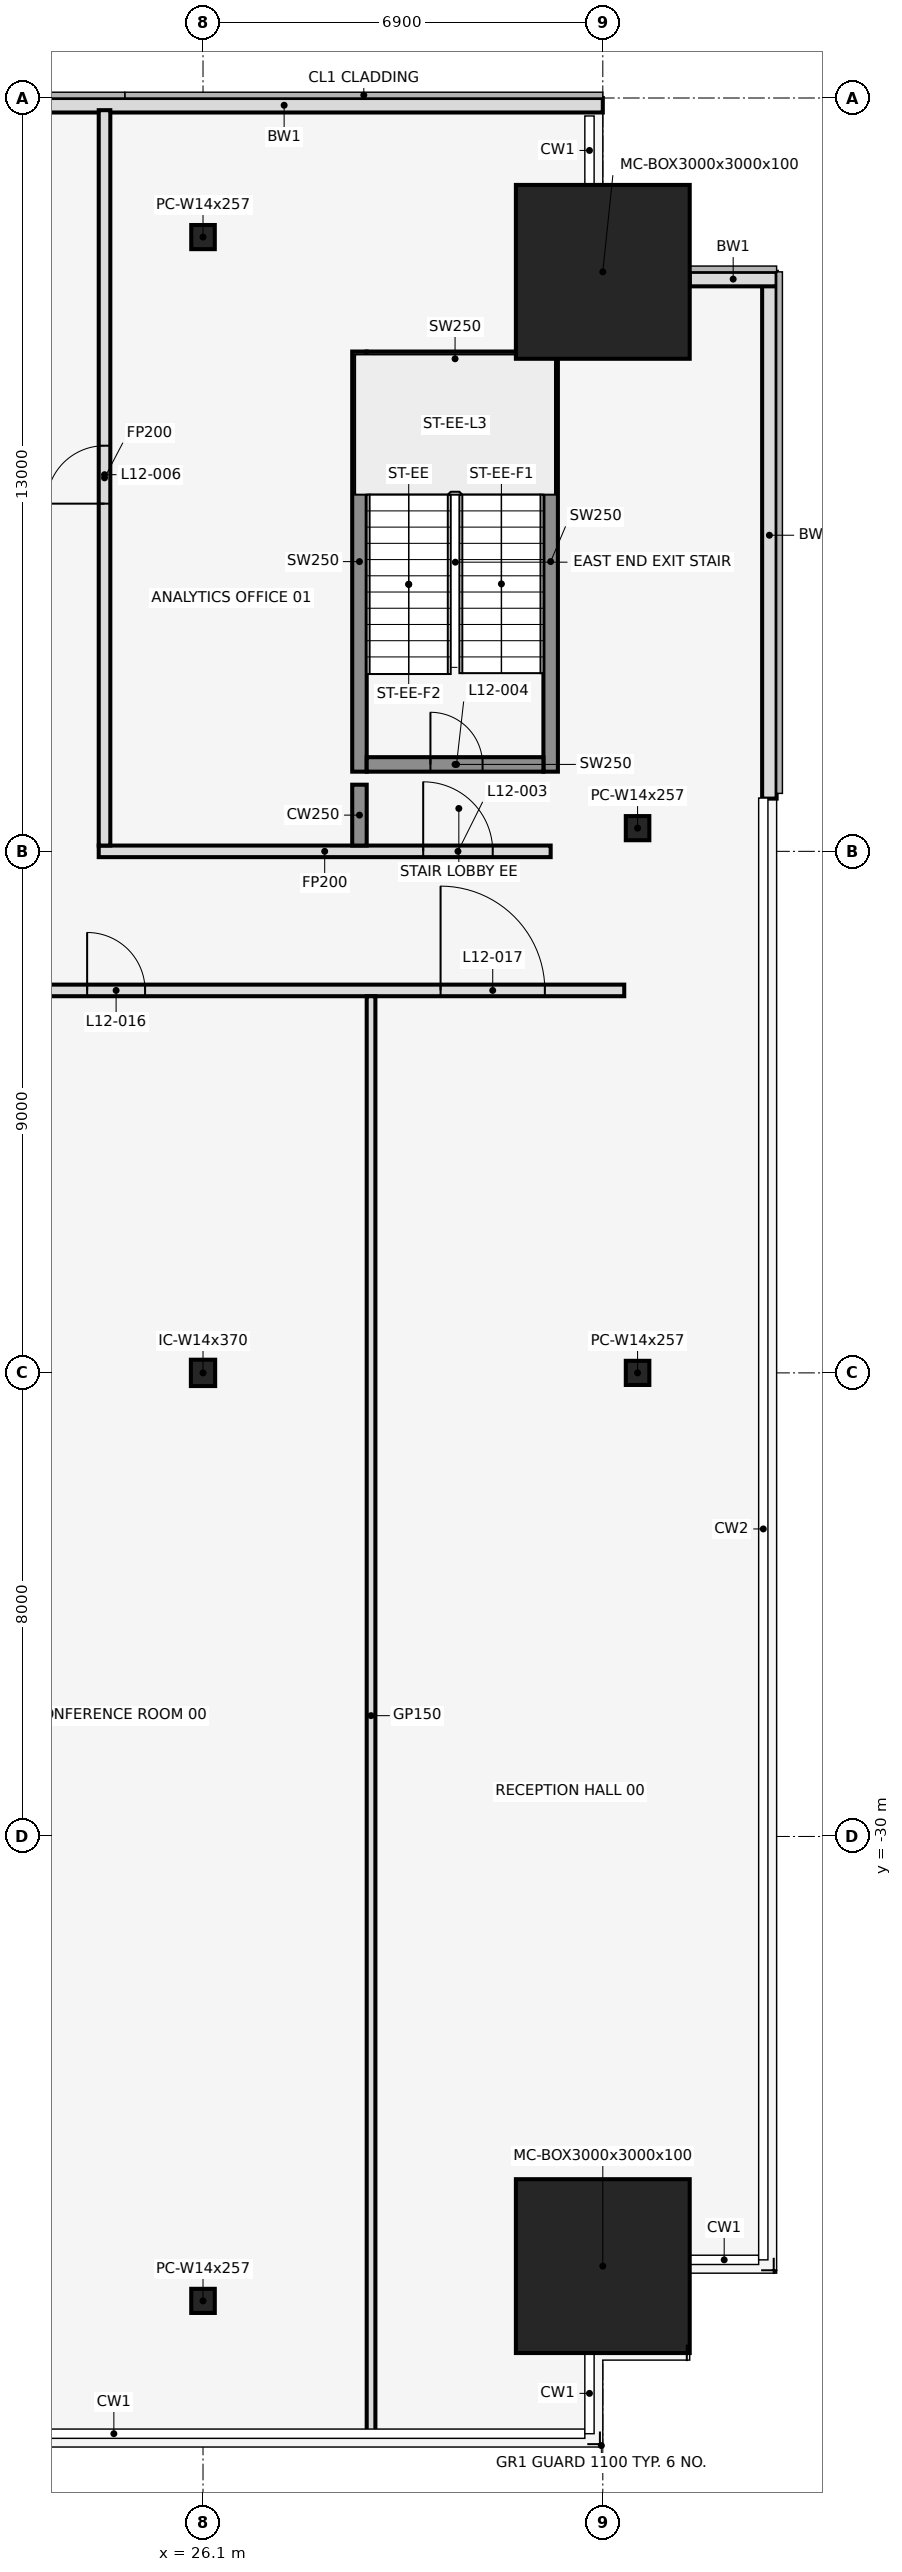
"""IFC4 building model, lengths in metres.
Left out: names, types, materials, properties, quantities, classifications, styles, units other than length and angle.
Written with IfcOpenShell. Run it as: python <this file> out.ifc"""

import sys

from ifc_helpers import new_model, si_unit, direction, frame, frame_2d, origin, origin_2d, place, context, subcontext, project, spatial, rectangle, hollow_rectangle, i_section, extrude, element, fill, save


model = new_model("IFC4")
c1 = context("Model", 3, precision=1e-05, world=origin(), true_north=direction((0.0, 1.0)))
c2 = subcontext(c1, "Body", "Model", "MODEL_VIEW")
j1 = project(units=[si_unit("LENGTHUNIT", "METRE"), si_unit("PLANEANGLEUNIT", "RADIAN")], contexts=[c1])
p1 = place(None, origin())
s1 = spatial("IfcSite", under=j1, at=p1, CompositionType="ELEMENT")
p2 = place(p1, origin())
s2 = spatial("IfcBuilding", under=s1, at=p2, CompositionType="ELEMENT")
p3 = place(p2, frame((0.0, 0.0, 62.0)))
s3 = spatial("IfcBuildingStorey", under=s2, at=p3, CompositionType="ELEMENT", Elevation=62.0)
for number, where, z_axis, x_axis in (
    (1, (26.1, -38.014, 0.0), (0.0, 0.0, 1.0), (1.0, 0.0, 0.0)),
    (2, (26.1, -2.4, 0.0), (0.0, 0.0, 1.0), (1.0, 0.0, 0.0)),
):
    element("IfcColumn", number, at=place(p3, frame(where, z_axis=z_axis, x_axis=x_axis)), inside=s3, PredefinedType="COLUMN", context=c2, shape_type="SweptSolid", body=[
        extrude(i_section(OverallWidth=0.406, OverallDepth=0.417, WebThickness=0.03, FlangeThickness=0.048, at=origin_2d()), origin(), (0.0, 0.0, 1.0), 4.5),
    ])
for number, where, z_axis, x_axis in (
    (3, (33.0, -37.414, 0.0), (0.0, 0.0, 1.0), (1.0, 0.0, 0.0)),
    (4, (33.0, -3.0, 0.0), (0.0, 0.0, 1.0), (1.0, 0.0, 0.0)),
):
    element("IfcColumn", number, at=place(p3, frame(where, z_axis=z_axis, x_axis=x_axis)), inside=s3, PredefinedType="COLUMN", context=c2, shape_type="SweptSolid", body=[
        extrude(hollow_rectangle(XDim=3.0, YDim=3.0, WallThickness=0.1, at=origin_2d()), origin(), (0.0, 0.0, 1.0), 4.5),
    ])
for number, where, z_axis, x_axis in (
    (5, (33.6, -12.6, 0.0), (0.0, 0.0, 1.0), (1.0, 0.0, 0.0)),
    (6, (33.6, -22.0, 0.0), (0.0, 0.0, 1.0), (1.0, 0.0, 0.0)),
):
    element("IfcColumn", number, at=place(p3, frame(where, z_axis=z_axis, x_axis=x_axis)), inside=s3, PredefinedType="COLUMN", context=c2, shape_type="SweptSolid", body=[
        extrude(i_section(OverallWidth=0.406, OverallDepth=0.417, WebThickness=0.03, FlangeThickness=0.048, at=origin_2d()), origin(), (0.0, 0.0, 1.0), 4.5),
    ])
p4 = place(p3, frame((26.1, -22.0, 0.0), z_axis=(0.0, 0.0, 1.0), x_axis=(1.0, 0.0, 0.0)))
e7 = element("IfcColumn", 7, at=p4, inside=s3, PredefinedType="COLUMN", context=c2, shape_type="SweptSolid", body=[
    extrude(i_section(OverallWidth=0.419, OverallDepth=0.455, WebThickness=0.042, FlangeThickness=0.068, at=origin_2d()), origin(), (0.0, 0.0, 1.0), 4.5),
])
p5 = place(p3, frame((33.0, -0.125, 0.0), z_axis=(0.0, 0.0, 1.0), x_axis=(-1.0, 0.0, 0.0)))
e8 = element("IfcWall", 8, at=p5, inside=s3, PredefinedType="STANDARD", context=c2, shape_type="SweptSolid", body=[
    extrude(rectangle(XDim=11.0, YDim=0.25, at=frame_2d((5.5, 0.0))), origin(), (0.0, 0.0, 1.0), 4.35),
])
p6 = place(p3, frame((35.875, -12.09, 0.0), z_axis=(0.0, 0.0, 1.0), x_axis=(0.0, 1.0, 0.0)))
e9 = element("IfcWall", 9, at=p6, inside=s3, PredefinedType="STANDARD", context=c2, shape_type="SweptSolid", body=[
    extrude(rectangle(XDim=9.09, YDim=0.25, at=frame_2d((4.545, 0.0))), origin(), (0.0, 0.0, 1.0), 4.35),
])
p7 = place(p3, frame((36.0, -3.125, 0.0), z_axis=(0.0, 0.0, 1.0), x_axis=(-1.0, 0.0, 0.0)))
e10 = element("IfcWall", 10, at=p7, inside=s3, PredefinedType="STANDARD", context=c2, shape_type="SweptSolid", body=[
    extrude(rectangle(XDim=1.5, YDim=0.25, at=frame_2d((0.75, 0.0))), origin(), (0.0, 0.0, 1.0), 4.35),
])
for number, where, z_axis, x_axis in (
    (11, (28.8, -11.625, 0.0), (0.0, 0.0, 1.0), (0.0, 1.0, 0.0)),
    (12, (32.1, -11.625, 0.0), (0.0, 0.0, 1.0), (0.0, 1.0, 0.0)),
):
    element("IfcWall", number, at=place(p3, frame(where, z_axis=z_axis, x_axis=x_axis)), inside=s3, PredefinedType="SHEAR", context=c2, shape_type="SweptSolid", body=[
        extrude(rectangle(XDim=7.25, YDim=0.25, at=frame_2d((3.625, 0.0))), origin(), (0.0, 0.0, 1.0), 4.5),
    ])
p8 = place(p3, frame((28.925, -11.5, 0.0), z_axis=(0.0, 0.0, 1.0), x_axis=(1.0, 0.0, 0.0)))
e13 = element("IfcWall", 13, at=p8, inside=s3, PredefinedType="SHEAR", context=c2, shape_type="SweptSolid", body=[
    extrude(rectangle(XDim=3.05, YDim=0.25, at=frame_2d((1.525, 0.0))), origin(), (0.0, 0.0, 1.0), 4.5),
])
p9 = place(p8, frame((1.1, 0.0, 0.0)))
e14 = element("IfcOpeningElement", 14, at=p9, cuts=e13, PredefinedType="OPENING", context=c2, shape_type="SweptSolid", body=[
    extrude(rectangle(XDim=0.9, YDim=2.1, at=frame_2d((0.45, 1.05))), frame((0.0, 0.137, 0.0), z_axis=(0.0, -1.0, 0.0), x_axis=(1.0, 0.0, 0.0)), (0.0, 0.0, 1.0), 0.274),
])
p10 = place(p3, frame((28.925, -4.5, 0.0), z_axis=(0.0, 0.0, 1.0), x_axis=(1.0, 0.0, 0.0)))
e15 = element("IfcWall", 15, at=p10, inside=s3, PredefinedType="SHEAR", context=c2, shape_type="SweptSolid", body=[
    extrude(rectangle(XDim=3.05, YDim=0.25, at=frame_2d((1.525, 0.0))), origin(), (0.0, 0.0, 1.0), 4.5),
])
p11 = place(p3, frame((-33.37, -15.4, 0.0), z_axis=(0.0, 0.0, 1.0), x_axis=(1.0, 0.0, 0.0)))
e16 = element("IfcWall", 16, at=p11, inside=s3, PredefinedType="PARTITIONING", context=c2, shape_type="SweptSolid", body=[
    extrude(rectangle(XDim=66.74, YDim=0.2, at=frame_2d((33.37, 0.0))), origin(), (0.0, 0.0, 1.0), 3.418),
])
p12 = place(p11, frame((2.8, 0.0, 0.0)))
e17 = element("IfcOpeningElement", 17, at=p12, cuts=e16, PredefinedType="OPENING", context=c2, shape_type="SweptSolid", body=[
    extrude(rectangle(XDim=1.8, YDim=2.1, at=frame_2d((0.9, 1.05))), frame((0.0, 0.112, 0.0), z_axis=(0.0, -1.0, 0.0), x_axis=(1.0, 0.0, 0.0)), (0.0, 0.0, 1.0), 0.224),
])
p13 = place(p11, frame((11.17, 0.0, 0.0)))
e18 = element("IfcOpeningElement", 18, at=p13, cuts=e16, PredefinedType="OPENING", context=c2, shape_type="SweptSolid", body=[
    extrude(rectangle(XDim=0.9, YDim=2.1, at=frame_2d((0.45, 1.05))), frame((0.0, 0.112, 0.0), z_axis=(0.0, -1.0, 0.0), x_axis=(1.0, 0.0, 0.0)), (0.0, 0.0, 1.0), 0.224),
])
p14 = place(p11, frame((19.87, 0.0, 0.0)))
e19 = element("IfcOpeningElement", 19, at=p14, cuts=e16, PredefinedType="OPENING", context=c2, shape_type="SweptSolid", body=[
    extrude(rectangle(XDim=1.0, YDim=2.1, at=frame_2d((0.5, 1.05))), frame((0.0, 0.112, 0.0), z_axis=(0.0, -1.0, 0.0), x_axis=(1.0, 0.0, 0.0)), (0.0, 0.0, 1.0), 0.224),
])
p15 = place(p11, frame((26.67, 0.0, 0.0)))
e20 = element("IfcOpeningElement", 20, at=p15, cuts=e16, PredefinedType="OPENING", context=c2, shape_type="SweptSolid", body=[
    extrude(rectangle(XDim=1.8, YDim=2.1, at=frame_2d((0.9, 1.05))), frame((0.0, 0.112, 0.0), z_axis=(0.0, -1.0, 0.0), x_axis=(1.0, 0.0, 0.0)), (0.0, 0.0, 1.0), 0.224),
])
p16 = place(p11, frame((33.87, 0.0, 0.0)))
e21 = element("IfcOpeningElement", 21, at=p16, cuts=e16, PredefinedType="OPENING", context=c2, shape_type="SweptSolid", body=[
    extrude(rectangle(XDim=1.8, YDim=2.1, at=frame_2d((0.9, 1.05))), frame((0.0, 0.112, 0.0), z_axis=(0.0, -1.0, 0.0), x_axis=(1.0, 0.0, 0.0)), (0.0, 0.0, 1.0), 0.224),
])
p17 = place(p11, frame((45.47, 0.0, 0.0)))
e22 = element("IfcOpeningElement", 22, at=p17, cuts=e16, PredefinedType="OPENING", context=c2, shape_type="SweptSolid", body=[
    extrude(rectangle(XDim=1.8, YDim=2.1, at=frame_2d((0.9, 1.05))), frame((0.0, 0.112, 0.0), z_axis=(0.0, -1.0, 0.0), x_axis=(1.0, 0.0, 0.0)), (0.0, 0.0, 1.0), 0.224),
])
p18 = place(p11, frame((57.47, 0.0, 0.0)))
e23 = element("IfcOpeningElement", 23, at=p18, cuts=e16, PredefinedType="OPENING", context=c2, shape_type="SweptSolid", body=[
    extrude(rectangle(XDim=1.0, YDim=2.1, at=frame_2d((0.5, 1.05))), frame((0.0, 0.112, 0.0), z_axis=(0.0, -1.0, 0.0), x_axis=(1.0, 0.0, 0.0)), (0.0, 0.0, 1.0), 0.224),
])
p19 = place(p11, frame((63.57, 0.0, 0.0)))
e24 = element("IfcOpeningElement", 24, at=p19, cuts=e16, PredefinedType="OPENING", context=c2, shape_type="SweptSolid", body=[
    extrude(rectangle(XDim=1.8, YDim=2.1, at=frame_2d((0.9, 1.05))), frame((0.0, 0.112, 0.0), z_axis=(0.0, -1.0, 0.0), x_axis=(1.0, 0.0, 0.0)), (0.0, 0.0, 1.0), 0.224),
])
p20 = place(p3, frame((24.3, -13.0, 0.0), z_axis=(0.0, 0.0, 1.0), x_axis=(1.0, 0.0, 0.0)))
e25 = element("IfcWall", 25, at=p20, inside=s3, PredefinedType="PARTITIONING", context=c2, shape_type="SweptSolid", body=[
    extrude(rectangle(XDim=7.8, YDim=0.2, at=frame_2d((3.9, 0.0))), origin(), (0.0, 0.0, 1.0), 3.418),
])
p21 = place(p20, frame((5.6, 0.0, 0.0)))
e26 = element("IfcOpeningElement", 26, at=p21, cuts=e25, PredefinedType="OPENING", context=c2, shape_type="SweptSolid", body=[
    extrude(rectangle(XDim=1.2, YDim=2.1, at=frame_2d((0.6, 1.05))), frame((0.0, 0.112, 0.0), z_axis=(0.0, -1.0, 0.0), x_axis=(1.0, 0.0, 0.0)), (0.0, 0.0, 1.0), 0.224),
])
p22 = place(p3, frame((24.4, -12.9, 0.0), z_axis=(0.0, 0.0, 1.0), x_axis=(0.0, 1.0, 0.0)))
e27 = element("IfcWall", 27, at=p22, inside=s3, PredefinedType="PARTITIONING", context=c2, shape_type="SweptSolid", body=[
    extrude(rectangle(XDim=12.69, YDim=0.2, at=frame_2d((6.345, 0.0))), origin(), (0.0, 0.0, 1.0), 3.418),
])
p23 = place(p22, frame((5.9, 0.0, 0.0)))
e28 = element("IfcOpeningElement", 28, at=p23, cuts=e27, PredefinedType="OPENING", context=c2, shape_type="SweptSolid", body=[
    extrude(rectangle(XDim=1.0, YDim=2.1, at=frame_2d((0.5, 1.05))), frame((0.0, 0.112, 0.0), z_axis=(0.0, -1.0, 0.0), x_axis=(1.0, 0.0, 0.0)), (0.0, 0.0, 1.0), 0.224),
])
p24 = place(p3, frame((28.8, -12.9, 0.0), z_axis=(0.0, 0.0, 1.0), x_axis=(0.0, 1.0, 0.0)))
e29 = element("IfcWall", 29, at=p24, inside=s3, PredefinedType="SHEAR", context=c2, shape_type="SweptSolid", body=[
    extrude(rectangle(XDim=1.05, YDim=0.25, at=frame_2d((0.525, 0.0))), origin(), (0.0, 0.0, 1.0), 4.5),
])
p25 = place(p3, frame((29.0, -40.33, 0.0), z_axis=(0.0, 0.0, 1.0), x_axis=(0.0, 1.0, 0.0)))
e30 = element("IfcWall", 30, at=p25, inside=s3, PredefinedType="PARTITIONING", context=c2, shape_type="SweptSolid", body=[
    extrude(rectangle(XDim=24.83, YDim=0.15, at=frame_2d((12.415, 0.0))), origin(), (0.0, 0.0, 1.0), 3.418),
])
p26 = place(p21, origin())
e31 = element("IfcDoor", 31, at=p26, inside=s3, OperationType="SINGLE_SWING_RIGHT", PredefinedType="DOOR", context=c2, shape_type="SweptSolid", body=[
    extrude(rectangle(XDim=1.2, YDim=2.1, at=frame_2d((0.6, 1.05))), frame((0.0, 0.025, 0.0), z_axis=(0.0, -1.0, 0.0), x_axis=(1.0, 0.0, 0.0)), (0.0, 0.0, 1.0), 0.05),
])
fill(e26, e31)
p27 = place(p9, origin())
e32 = element("IfcDoor", 32, at=p27, inside=s3, OperationType="SINGLE_SWING_LEFT", PredefinedType="DOOR", context=c2, shape_type="SweptSolid", body=[
    extrude(rectangle(XDim=0.9, YDim=2.1, at=frame_2d((0.45, 1.05))), frame((0.0, 0.025, 0.0), z_axis=(0.0, -1.0, 0.0), x_axis=(1.0, 0.0, 0.0)), (0.0, 0.0, 1.0), 0.05),
])
fill(e14, e32)
p28 = place(p23, frame((1.0, 0.0, 0.0), z_axis=(0.0, 0.0, 1.0), x_axis=(-1.0, 0.0, 0.0)))
e33 = element("IfcDoor", 33, at=p28, inside=s3, OperationType="SINGLE_SWING_RIGHT", PredefinedType="DOOR", context=c2, shape_type="SweptSolid", body=[
    extrude(rectangle(XDim=1.0, YDim=2.1, at=frame_2d((0.5, 1.05))), frame((0.0, 0.025, 0.0), z_axis=(0.0, -1.0, 0.0), x_axis=(1.0, 0.0, 0.0)), (0.0, 0.0, 1.0), 0.05),
])
fill(e28, e33)
p29 = place(p18, frame((1.0, 0.0, 0.0), z_axis=(0.0, 0.0, 1.0), x_axis=(-1.0, 0.0, 0.0)))
e34 = element("IfcDoor", 34, at=p29, inside=s3, OperationType="SINGLE_SWING_LEFT", PredefinedType="DOOR", context=c2, shape_type="SweptSolid", body=[
    extrude(rectangle(XDim=1.0, YDim=2.1, at=frame_2d((0.5, 1.05))), frame((0.0, 0.025, 0.0), z_axis=(0.0, -1.0, 0.0), x_axis=(1.0, 0.0, 0.0)), (0.0, 0.0, 1.0), 0.05),
])
fill(e23, e34)
p30 = place(p19, origin())
e35 = element("IfcDoor", 35, at=p30, inside=s3, OperationType="SINGLE_SWING_LEFT", PredefinedType="DOOR", context=c2, shape_type="SweptSolid", body=[
    extrude(rectangle(XDim=1.8, YDim=2.1, at=frame_2d((0.9, 1.05))), frame((0.0, 0.025, 0.0), z_axis=(0.0, -1.0, 0.0), x_axis=(1.0, 0.0, 0.0)), (0.0, 0.0, 1.0), 0.05),
])
fill(e24, e35)
save(model, sys.argv[1])
